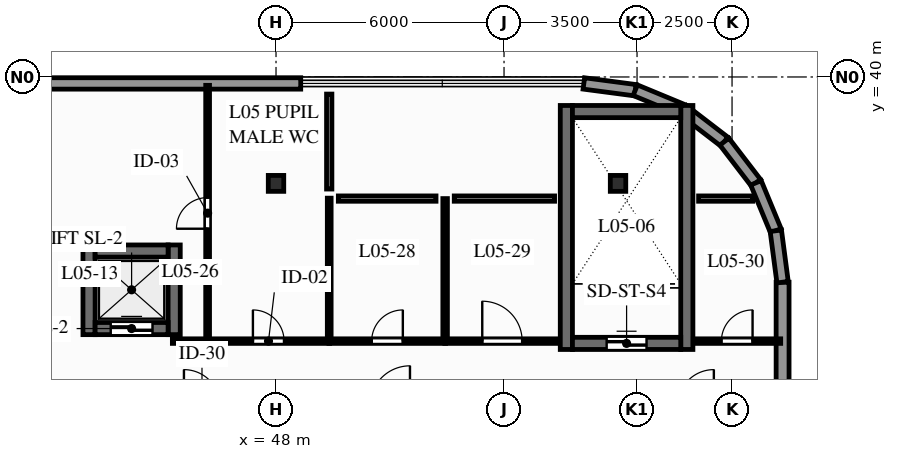
"""IFC4 building model, lengths in metres.
Left out: names, types, materials, properties, quantities, classifications, styles, units other than length and angle.
Written with IfcOpenShell. Run it as: python <this file> out.ifc"""

import sys

from ifc_helpers import new_model, si_unit, direction, frame, frame_2d, origin, origin_2d, place, context, subcontext, project, spatial, rectangle, i_section, extrude, element, fill, save


model = new_model("IFC4")
c1 = context("Model", 3, precision=1e-05, world=origin(), true_north=direction((0.0, 1.0)))
c2 = subcontext(c1, "Body", "Model", "MODEL_VIEW")
j1 = project(units=[si_unit("LENGTHUNIT", "METRE"), si_unit("PLANEANGLEUNIT", "RADIAN")], contexts=[c1])
p1 = place(None, origin())
s1 = spatial("IfcSite", under=j1, at=p1, CompositionType="ELEMENT")
p2 = place(p1, origin())
s2 = spatial("IfcBuilding", under=s1, at=p2, CompositionType="ELEMENT")
p3 = place(p2, frame((0.0, 0.0, 22.5)))
s3 = spatial("IfcBuildingStorey", under=s2, at=p3, CompositionType="ELEMENT", Elevation=22.5)
for number, where, z_axis, x_axis in (
    (1, (48.0, 37.2, 0.0), (0.0, 0.0, 1.0), (1.0, 0.0, 0.0)),
    (2, (57.0, 37.2, 0.0), (0.0, 0.0, 1.0), (1.0, 0.0, 0.0)),
):
    element("IfcColumn", number, at=place(p3, frame(where, z_axis=z_axis, x_axis=x_axis)), inside=s3, PredefinedType="COLUMN", context=c2, shape_type="SweptSolid", body=[
        extrude(i_section(OverallWidth=0.407, OverallDepth=0.419, WebThickness=0.031, FlangeThickness=0.049, FilletRadius=0.015, at=origin_2d()), origin(), (0.0, 0.0, 1.0), 5.5),
    ])
p4 = place(p3, frame((61.33, -1.83, 0.0), z_axis=(0.0, 0.0, 1.0), x_axis=(0.0, 1.0, 0.0)))
e3 = element("IfcWall", 3, at=p4, inside=s3, PredefinedType="STANDARD", context=c2, shape_type="SweptSolid", body=[
    extrude(rectangle(XDim=36.43, YDim=0.34, at=frame_2d((18.215, 0.0))), origin(), (0.0, 0.0, 1.0), 5.23),
])
p5 = place(p4, frame((6.33, 0.0, 0.9)))
e4 = element("IfcOpeningElement", 4, at=p5, cuts=e3, PredefinedType="OPENING", context=c2, shape_type="SweptSolid", body=[
    extrude(rectangle(XDim=2.1, YDim=2.05, at=frame_2d((1.05, 1.025))), frame((0.0, 0.18, 0.0), z_axis=(0.0, -1.0, 0.0), x_axis=(1.0, 0.0, 0.0)), (0.0, 0.0, 1.0), 0.36),
])
p6 = place(p4, frame((15.33, 0.0, 0.9)))
e5 = element("IfcOpeningElement", 5, at=p6, cuts=e3, PredefinedType="OPENING", context=c2, shape_type="SweptSolid", body=[
    extrude(rectangle(XDim=2.1, YDim=2.05, at=frame_2d((1.05, 1.025))), frame((0.0, 0.18, 0.0), z_axis=(0.0, -1.0, 0.0), x_axis=(1.0, 0.0, 0.0)), (0.0, 0.0, 1.0), 0.36),
])
p7 = place(p4, frame((21.03, 0.0, 0.9)))
e6 = element("IfcOpeningElement", 6, at=p7, cuts=e3, PredefinedType="OPENING", context=c2, shape_type="SweptSolid", body=[
    extrude(rectangle(XDim=2.1, YDim=2.05, at=frame_2d((1.05, 1.025))), frame((0.0, 0.18, 0.0), z_axis=(0.0, -1.0, 0.0), x_axis=(1.0, 0.0, 0.0)), (0.0, 0.0, 1.0), 0.36),
])
p8 = place(p4, frame((28.63, 0.0, 0.9)))
e7 = element("IfcOpeningElement", 7, at=p8, cuts=e3, PredefinedType="OPENING", context=c2, shape_type="SweptSolid", body=[
    extrude(rectangle(XDim=2.1, YDim=2.05, at=frame_2d((1.05, 1.025))), frame((0.0, 0.18, 0.0), z_axis=(0.0, -1.0, 0.0), x_axis=(1.0, 0.0, 0.0)), (0.0, 0.0, 1.0), 0.36),
])
p9 = place(p3, frame((56.1, 39.83, 0.0), z_axis=(0.0, 0.0, 1.0), x_axis=(0.991442117533, -0.13054703207, 0.0)))
e8 = element("IfcWall", 8, at=p9, inside=s3, PredefinedType="STANDARD", context=c2, shape_type="SweptSolid", body=[
    extrude(rectangle(XDim=1.365, YDim=0.3, at=frame_2d((0.683, 0.0))), origin(), (0.0, 0.0, 1.0), 5.23),
])
p10 = place(p3, frame((57.454, 39.652, 0.0), z_axis=(0.0, 0.0, 1.0), x_axis=(0.923894797396, -0.382646577594, 0.0)))
e9 = element("IfcWall", 9, at=p10, inside=s3, PredefinedType="STANDARD", context=c2, shape_type="SweptSolid", body=[
    extrude(rectangle(XDim=1.365, YDim=0.3, at=frame_2d((0.683, 0.0))), origin(), (0.0, 0.0, 1.0), 5.23),
])
for number, where, z_axis, x_axis in (
    (10, (58.715, 39.129, 0.0), (0.0, 0.0, 1.0), (0.793, -0.609, 0.0)),
    (11, (59.798, 38.298, 0.0), (0.0, 0.0, 1.0), (0.609, -0.793, 0.0)),
):
    element("IfcWall", number, at=place(p3, frame(where, z_axis=z_axis, x_axis=x_axis)), inside=s3, PredefinedType="STANDARD", context=c2, shape_type="SweptSolid", body=[
        extrude(rectangle(XDim=1.365, YDim=0.3, at=frame_2d((0.683, 0.0))), origin(), (0.0, 0.0, 1.0), 5.23),
    ])
p11 = place(p3, frame((60.629, 37.215, 0.0), z_axis=(0.0, 0.0, 1.0), x_axis=(0.382646577594, -0.923894797396, 0.0)))
e12 = element("IfcWall", 12, at=p11, inside=s3, PredefinedType="STANDARD", context=c2, shape_type="SweptSolid", body=[
    extrude(rectangle(XDim=1.365, YDim=0.3, at=frame_2d((0.683, 0.0))), origin(), (0.0, 0.0, 1.0), 5.23),
])
p12 = place(p3, frame((61.152, 35.954, 0.0), z_axis=(0.0, 0.0, 1.0), x_axis=(0.13054703207, -0.991442117533, 0.0)))
e13 = element("IfcWall", 13, at=p12, inside=s3, PredefinedType="STANDARD", context=c2, shape_type="SweptSolid", body=[
    extrude(rectangle(XDim=1.365, YDim=0.3, at=frame_2d((0.683, 0.0))), origin(), (0.0, 0.0, 1.0), 5.23),
])
p13 = place(p3, frame((41.35, 39.83, 0.0), z_axis=(0.0, 0.0, 1.0), x_axis=(1.0, 0.0, 0.0)))
e14 = element("IfcWall", 14, at=p13, inside=s3, PredefinedType="STANDARD", context=c2, shape_type="SweptSolid", body=[
    extrude(rectangle(XDim=7.3, YDim=0.3, at=frame_2d((3.65, 0.0))), origin(), (0.0, 0.0, 1.0), 5.23),
])
for number, where, z_axis, x_axis in (
    (15, (55.64, 32.83, 0.0), (0.0, 0.0, 1.0), (0.0, 1.0, 0.0)),
    (16, (58.81, 32.83, 0.0), (0.0, 0.0, 1.0), (0.0, 1.0, 0.0)),
):
    element("IfcWall", number, at=place(p3, frame(where, z_axis=z_axis, x_axis=x_axis)), inside=s3, PredefinedType="SHEAR", context=c2, shape_type="SweptSolid", body=[
        extrude(rectangle(XDim=6.42, YDim=0.32, at=frame_2d((3.21, 0.0))), origin(), (0.0, 0.0, 1.0), 5.23),
    ])
p14 = place(p3, frame((55.8, 32.99, 0.0), z_axis=(0.0, 0.0, 1.0), x_axis=(1.0, 0.0, 0.0)))
e17 = element("IfcWall", 17, at=p14, inside=s3, PredefinedType="SHEAR", context=c2, shape_type="SweptSolid", body=[
    extrude(rectangle(XDim=2.85, YDim=0.32, at=frame_2d((1.425, 0.0))), origin(), (0.0, 0.0, 1.0), 5.23),
])
p15 = place(p14, frame((0.9, 0.0, 0.0)))
e18 = element("IfcOpeningElement", 18, at=p15, cuts=e17, PredefinedType="OPENING", context=c2, shape_type="SweptSolid", body=[
    extrude(rectangle(XDim=1.05, YDim=2.06, at=frame_2d((0.525, 1.03))), frame((0.0, 0.17, 0.0), z_axis=(0.0, -1.0, 0.0), x_axis=(1.0, 0.0, 0.0)), (0.0, 0.0, 1.0), 0.34),
])
p16 = place(p3, frame((58.65, 39.09, 0.0), z_axis=(0.0, 0.0, 1.0), x_axis=(-1.0, 0.0, 0.0)))
e19 = element("IfcWall", 19, at=p16, inside=s3, PredefinedType="SHEAR", context=c2, shape_type="SweptSolid", body=[
    extrude(rectangle(XDim=2.85, YDim=0.32, at=frame_2d((1.425, 0.0))), origin(), (0.0, 0.0, 1.0), 5.23),
])
for number, where, z_axis, x_axis in (
    (20, (43.08, 33.22, 0.0), (0.0, 0.0, 1.0), (0.0, 1.0, 0.0)),
    (21, (45.32, 33.22, 0.0), (0.0, 0.0, 1.0), (0.0, 1.0, 0.0)),
):
    element("IfcWall", number, at=place(p3, frame(where, z_axis=z_axis, x_axis=x_axis)), inside=s3, PredefinedType="SHEAR", context=c2, shape_type="SweptSolid", body=[
        extrude(rectangle(XDim=2.36, YDim=0.32, at=frame_2d((1.18, 0.0))), origin(), (0.0, 0.0, 1.0), 5.23),
    ])
p17 = place(p3, frame((43.24, 33.38, 0.0), z_axis=(0.0, 0.0, 1.0), x_axis=(1.0, 0.0, 0.0)))
e22 = element("IfcWall", 22, at=p17, inside=s3, PredefinedType="SHEAR", context=c2, shape_type="SweptSolid", body=[
    extrude(rectangle(XDim=1.92, YDim=0.32, at=frame_2d((0.96, 0.0))), origin(), (0.0, 0.0, 1.0), 5.23),
])
p18 = place(p17, frame((0.41, 0.0, 0.0)))
e23 = element("IfcOpeningElement", 23, at=p18, cuts=e22, PredefinedType="OPENING", context=c2, shape_type="SweptSolid", body=[
    extrude(rectangle(XDim=1.1, YDim=2.06, at=frame_2d((0.55, 1.03))), frame((0.0, 0.17, 0.0), z_axis=(0.0, -1.0, 0.0), x_axis=(1.0, 0.0, 0.0)), (0.0, 0.0, 1.0), 0.34),
])
p19 = place(p3, frame((43.24, 35.42, 0.0), z_axis=(0.0, 0.0, 1.0), x_axis=(1.0, 0.0, 0.0)))
e24 = element("IfcWall", 24, at=p19, inside=s3, PredefinedType="SHEAR", context=c2, shape_type="SweptSolid", body=[
    extrude(rectangle(XDim=1.92, YDim=0.32, at=frame_2d((0.96, 0.0))), origin(), (0.0, 0.0, 1.0), 5.23),
])
p20 = place(p3, frame((45.273, 33.05, 0.0), z_axis=(0.0, 0.0, 1.0), x_axis=(1.0, 0.0, 0.0)))
e25 = element("IfcWall", 25, at=p20, inside=s3, PredefinedType="PARTITIONING", context=c2, shape_type="SweptSolid", body=[
    extrude(rectangle(XDim=0.938, YDim=0.12, at=frame_2d((0.469, 0.0))), origin(), (0.0, 0.0, 1.0), 5.23),
])
p21 = place(p3, frame((46.193, 33.05, 0.0), z_axis=(0.0, 0.0, 1.0), x_axis=(1.0, 0.0, 0.0)))
e26 = element("IfcWall", 26, at=p21, inside=s3, PredefinedType="PARTITIONING", context=c2, shape_type="SweptSolid", body=[
    extrude(rectangle(XDim=3.219, YDim=0.12, at=frame_2d((1.609, 0.0))), origin(), (0.0, 0.0, 1.0), 4.585),
])
p22 = place(p21, frame((1.199, 0.0, 0.0)))
e27 = element("IfcOpeningElement", 27, at=p22, cuts=e26, PredefinedType="OPENING", context=c2, shape_type="SweptSolid", body=[
    extrude(rectangle(XDim=0.82, YDim=2.02, at=frame_2d((0.41, 1.01))), frame((0.0, 0.07, 0.0), z_axis=(0.0, -1.0, 0.0), x_axis=(1.0, 0.0, 0.0)), (0.0, 0.0, 1.0), 0.14),
])
p23 = place(p3, frame((49.393, 33.05, 0.0), z_axis=(0.0, 0.0, 1.0), x_axis=(1.0, 0.0, 0.0)))
e28 = element("IfcWall", 28, at=p23, inside=s3, PredefinedType="PARTITIONING", context=c2, shape_type="SweptSolid", body=[
    extrude(rectangle(XDim=3.069, YDim=0.12, at=frame_2d((1.534, 0.0))), origin(), (0.0, 0.0, 1.0), 5.23),
])
p24 = place(p23, frame((1.124, 0.0, 0.0)))
e29 = element("IfcOpeningElement", 29, at=p24, cuts=e28, PredefinedType="OPENING", context=c2, shape_type="SweptSolid", body=[
    extrude(rectangle(XDim=0.82, YDim=2.02, at=frame_2d((0.41, 1.01))), frame((0.0, 0.07, 0.0), z_axis=(0.0, -1.0, 0.0), x_axis=(1.0, 0.0, 0.0)), (0.0, 0.0, 1.0), 0.14),
])
p25 = place(p3, frame((52.443, 33.05, 0.0), z_axis=(0.0, 0.0, 1.0), x_axis=(1.0, 0.0, 0.0)))
e30 = element("IfcWall", 30, at=p25, inside=s3, PredefinedType="PARTITIONING", context=c2, shape_type="SweptSolid", body=[
    extrude(rectangle(XDim=3.019, YDim=0.12, at=frame_2d((1.509, 0.0))), origin(), (0.0, 0.0, 1.0), 5.23),
])
p26 = place(p25, frame((0.984, 0.0, 0.0)))
e31 = element("IfcOpeningElement", 31, at=p26, cuts=e30, PredefinedType="OPENING", context=c2, shape_type="SweptSolid", body=[
    extrude(rectangle(XDim=1.05, YDim=2.06, at=frame_2d((0.525, 1.03))), frame((0.0, 0.07, 0.0), z_axis=(0.0, -1.0, 0.0), x_axis=(1.0, 0.0, 0.0)), (0.0, 0.0, 1.0), 0.14),
])
p27 = place(p3, frame((58.98, 33.05, 0.0), z_axis=(0.0, 0.0, 1.0), x_axis=(1.0, 0.0, 0.0)))
e32 = element("IfcWall", 32, at=p27, inside=s3, PredefinedType="PARTITIONING", context=c2, shape_type="SweptSolid", body=[
    extrude(rectangle(XDim=2.3, YDim=0.12, at=frame_2d((1.15, 0.0))), origin(), (0.0, 0.0, 1.0), 5.23),
])
p28 = place(p27, frame((0.74, 0.0, 0.0)))
e33 = element("IfcOpeningElement", 33, at=p28, cuts=e32, PredefinedType="OPENING", context=c2, shape_type="SweptSolid", body=[
    extrude(rectangle(XDim=0.82, YDim=2.02, at=frame_2d((0.41, 1.01))), frame((0.0, 0.07, 0.0), z_axis=(0.0, -1.0, 0.0), x_axis=(1.0, 0.0, 0.0)), (0.0, 0.0, 1.0), 0.14),
])
p29 = place(p3, frame((46.2, 33.054, 0.0), z_axis=(0.0, 0.0, 1.0), x_axis=(0.0, 1.0, 0.0)))
e34 = element("IfcWall", 34, at=p29, inside=s3, PredefinedType="PARTITIONING", context=c2, shape_type="SweptSolid", body=[
    extrude(rectangle(XDim=6.726, YDim=0.1, at=frame_2d((3.363, 0.0))), origin(), (0.0, 0.0, 1.0), 4.666),
])
p30 = place(p29, frame((2.953, 0.0, 0.0)))
e35 = element("IfcOpeningElement", 35, at=p30, cuts=e34, PredefinedType="OPENING", context=c2, shape_type="SweptSolid", body=[
    extrude(rectangle(XDim=0.82, YDim=2.02, at=frame_2d((0.41, 1.01))), frame((0.0, 0.06, 0.0), z_axis=(0.0, -1.0, 0.0), x_axis=(1.0, 0.0, 0.0)), (0.0, 0.0, 1.0), 0.12),
])
p31 = place(p3, frame((49.4, 33.054, 0.0), z_axis=(0.0, 0.0, 1.0), x_axis=(0.0, 1.0, 0.0)))
e36 = element("IfcWall", 36, at=p31, inside=s3, PredefinedType="PARTITIONING", context=c2, shape_type="SweptSolid", body=[
    extrude(rectangle(XDim=3.757, YDim=0.1, at=frame_2d((1.879, 0.0))), origin(), (0.0, 0.0, 1.0), 5.23),
])
p32 = place(p3, frame((52.45, 33.054, 0.0), z_axis=(0.0, 0.0, 1.0), x_axis=(0.0, 1.0, 0.0)))
e37 = element("IfcWall", 37, at=p32, inside=s3, PredefinedType="PARTITIONING", context=c2, shape_type="SweptSolid", body=[
    extrude(rectangle(XDim=3.746, YDim=0.12, at=frame_2d((1.873, 0.0))), origin(), (0.0, 0.0, 1.0), 5.23),
])
p33 = place(p3, frame((49.4, 37.051, 0.0), z_axis=(0.0, 0.0, 1.0), x_axis=(0.0, 1.0, 0.0)))
e38 = element("IfcWall", 38, at=p33, inside=s3, PredefinedType="PARTITIONING", context=c2, shape_type="SweptSolid", body=[
    extrude(rectangle(XDim=2.499, YDim=0.14, at=frame_2d((1.25, 0.0))), origin(), (0.0, 0.0, 1.0), 4.666),
])
p34 = place(p3, frame((49.64, 36.8, 0.0), z_axis=(0.0, 0.0, 1.0), x_axis=(1.0, 0.0, 0.0)))
e39 = element("IfcWall", 39, at=p34, inside=s3, PredefinedType="PARTITIONING", context=c2, shape_type="SweptSolid", body=[
    extrude(rectangle(XDim=2.57, YDim=0.14, at=frame_2d((1.285, 0.0))), origin(), (0.0, 0.0, 1.0), 5.23),
])
p35 = place(p3, frame((52.69, 36.8, 0.0), z_axis=(0.0, 0.0, 1.0), x_axis=(1.0, 0.0, 0.0)))
e40 = element("IfcWall", 40, at=p35, inside=s3, PredefinedType="PARTITIONING", context=c2, shape_type="SweptSolid", body=[
    extrude(rectangle(XDim=2.64, YDim=0.14, at=frame_2d((1.32, 0.0))), origin(), (0.0, 0.0, 1.0), 5.23),
])
p36 = place(p3, frame((59.12, 36.8, 0.0), z_axis=(0.0, 0.0, 1.0), x_axis=(1.0, 0.0, 0.0)))
e41 = element("IfcWall", 41, at=p36, inside=s3, PredefinedType="PARTITIONING", context=c2, shape_type="SweptSolid", body=[
    extrude(rectangle(XDim=1.421, YDim=0.14, at=frame_2d((0.711, 0.0))), origin(), (0.0, 0.0, 1.0), 5.23),
])
p37 = place(p15, origin())
e42 = element("IfcDoor", 42, at=p37, inside=s3, OperationType="SINGLE_SWING_RIGHT", PredefinedType="DOOR", context=c2, shape_type="SweptSolid", body=[
    extrude(rectangle(XDim=1.05, YDim=2.06, at=frame_2d((0.525, 1.03))), frame((0.0, 0.025, 0.0), z_axis=(0.0, -1.0, 0.0), x_axis=(1.0, 0.0, 0.0)), (0.0, 0.0, 1.0), 0.05),
])
fill(e18, e42)
p38 = place(p18, origin())
e43 = element("IfcDoor", 43, at=p38, inside=s3, OperationType="SLIDING_TO_RIGHT", PredefinedType="DOOR", context=c2, shape_type="SweptSolid", body=[
    extrude(rectangle(XDim=1.1, YDim=2.06, at=frame_2d((0.55, 1.03))), frame((0.0, 0.025, 0.0), z_axis=(0.0, -1.0, 0.0), x_axis=(1.0, 0.0, 0.0)), (0.0, 0.0, 1.0), 0.05),
])
fill(e23, e43)
p39 = place(p22, origin())
e44 = element("IfcDoor", 44, at=p39, inside=s3, OperationType="SINGLE_SWING_LEFT", PredefinedType="DOOR", context=c2, shape_type="SweptSolid", body=[
    extrude(rectangle(XDim=0.82, YDim=2.02, at=frame_2d((0.41, 1.01))), frame((0.0, 0.025, 0.0), z_axis=(0.0, -1.0, 0.0), x_axis=(1.0, 0.0, 0.0)), (0.0, 0.0, 1.0), 0.05),
])
fill(e27, e44)
p40 = place(p24, origin())
e45 = element("IfcDoor", 45, at=p40, inside=s3, OperationType="SINGLE_SWING_RIGHT", PredefinedType="DOOR", context=c2, shape_type="SweptSolid", body=[
    extrude(rectangle(XDim=0.82, YDim=2.02, at=frame_2d((0.41, 1.01))), frame((0.0, 0.025, 0.0), z_axis=(0.0, -1.0, 0.0), x_axis=(1.0, 0.0, 0.0)), (0.0, 0.0, 1.0), 0.05),
])
fill(e29, e45)
p41 = place(p26, origin())
e46 = element("IfcDoor", 46, at=p41, inside=s3, OperationType="SINGLE_SWING_LEFT", PredefinedType="DOOR", context=c2, shape_type="SweptSolid", body=[
    extrude(rectangle(XDim=1.05, YDim=2.06, at=frame_2d((0.525, 1.03))), frame((0.0, 0.025, 0.0), z_axis=(0.0, -1.0, 0.0), x_axis=(1.0, 0.0, 0.0)), (0.0, 0.0, 1.0), 0.05),
])
fill(e31, e46)
p42 = place(p28, origin())
e47 = element("IfcDoor", 47, at=p42, inside=s3, OperationType="SINGLE_SWING_RIGHT", PredefinedType="DOOR", context=c2, shape_type="SweptSolid", body=[
    extrude(rectangle(XDim=0.82, YDim=2.02, at=frame_2d((0.41, 1.01))), frame((0.0, 0.025, 0.0), z_axis=(0.0, -1.0, 0.0), x_axis=(1.0, 0.0, 0.0)), (0.0, 0.0, 1.0), 0.05),
])
fill(e33, e47)
p43 = place(p30, origin())
e48 = element("IfcDoor", 48, at=p43, inside=s3, OperationType="SINGLE_SWING_LEFT", PredefinedType="DOOR", context=c2, shape_type="SweptSolid", body=[
    extrude(rectangle(XDim=0.82, YDim=2.02, at=frame_2d((0.41, 1.01))), frame((0.0, 0.025, 0.0), z_axis=(0.0, -1.0, 0.0), x_axis=(1.0, 0.0, 0.0)), (0.0, 0.0, 1.0), 0.05),
])
fill(e35, e48)
save(model, sys.argv[1])
